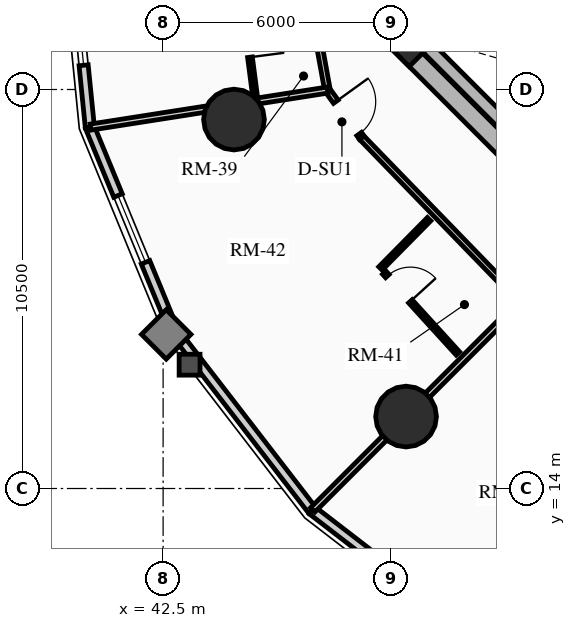
"""IFC4 building model, lengths in metres.
Left out: names, types, materials, properties, quantities, classifications, styles, units other than length and angle.
Written with IfcOpenShell. Run it as: python <this file> out.ifc"""

import sys

from ifc_helpers import new_model, si_unit, direction, frame, frame_2d, origin, origin_2d, place, context, subcontext, project, spatial, rectangle, circle, extrude, source, transform, mapped, element, fill, save


model = new_model("IFC4")
c1 = context("Model", 3, precision=1e-05, world=origin(), true_north=direction((0.0, 1.0)))
c2 = subcontext(c1, "Body", "Model", "MODEL_VIEW")
j1 = project(units=[si_unit("LENGTHUNIT", "METRE"), si_unit("PLANEANGLEUNIT", "RADIAN")], contexts=[c1])
p1 = place(None, origin())
s1 = spatial("IfcSite", under=j1, at=p1, CompositionType="ELEMENT")
p2 = place(p1, origin())
s2 = spatial("IfcBuilding", under=s1, at=p2, CompositionType="ELEMENT")
p3 = place(p2, frame((0.0, 0.0, 48.19)))
s3 = spatial("IfcBuildingStorey", under=s2, at=p3, CompositionType="ELEMENT", Elevation=48.19)
p4 = place(p3, frame((58.773, 15.661, 0.0), z_axis=(0.0, 0.0, 1.0), x_axis=(-0.707106781187, 0.707106781187, 0.0)))
e1 = element("IfcWall", 1, at=p4, inside=s3, PredefinedType="SHEAR", context=c2, shape_type="SweptSolid", body=[
    extrude(rectangle(XDim=14.3, YDim=0.5, at=frame_2d((7.15, 0.0))), origin(), (0.0, 0.0, 1.0), 2.91),
])
p5 = place(p3, frame((48.838, 25.596, 0.0), z_axis=(0.0, 0.0, 1.0), x_axis=(0.707106781187, 0.707106781187, 0.0)))
e2 = element("IfcWall", 2, at=p5, inside=s3, PredefinedType="SHEAR", context=c2, shape_type="SweptSolid", body=[
    extrude(rectangle(XDim=10.7, YDim=0.5, at=frame_2d((5.35, 0.0))), origin(), (0.0, 0.0, 1.0), 2.91),
])
m1 = source(origin(), c2, "Body", "SweptSolid", [
    extrude(rectangle(XDim=1.5, YDim=2.02, at=frame_2d((0.75, 1.01))), frame((0.0, 0.26, 0.0), z_axis=(0.0, -1.0, 0.0), x_axis=(1.0, 0.0, 0.0)), (0.0, 0.0, 1.0), 0.52),
])
p6 = place(p5, frame((4.6, 0.0, 0.0)))
e3 = element("IfcOpeningElement", 3, at=p6, cuts=e2, PredefinedType="OPENING", context=c2, shape_type="MappedRepresentation", body=[
    mapped(m1, transform((0.0, 0.0, 0.0), x_axis=(1.0, 0.0, 0.0), y_axis=(0.0, 1.0, 0.0), z_axis=(0.0, 0.0, 1.0), scale=1.0)),
])
p7 = place(p3, frame((61.096, 18.338, 0.0), z_axis=(0.0, 0.0, 1.0), x_axis=(-0.707106781187, 0.707106781187, 0.0)))
e4 = element("IfcWall", 4, at=p7, inside=s3, PredefinedType="SHEAR", context=c2, shape_type="SweptSolid", body=[
    extrude(rectangle(XDim=13.8, YDim=0.35, at=frame_2d((6.9, 0.0))), origin(), (0.0, 0.0, 1.0), 2.91),
])
m2 = source(origin(), c2, "Body", "SweptSolid", [
    extrude(rectangle(XDim=1.1, YDim=2.015, at=frame_2d((0.55, 1.007))), frame((0.0, 0.185, 0.0), z_axis=(0.0, -1.0, 0.0), x_axis=(1.0, 0.0, 0.0)), (0.0, 0.0, 1.0), 0.37),
])
p8 = place(p7, frame((4.9, 0.0, 0.0)))
e5 = element("IfcOpeningElement", 5, at=p8, cuts=e4, PredefinedType="OPENING", context=c2, shape_type="MappedRepresentation", body=[
    mapped(m2, transform((0.0, 0.0, 0.0), x_axis=(1.0, 0.0, 0.0), y_axis=(0.0, 1.0, 0.0), z_axis=(0.0, 0.0, 1.0), scale=1.0)),
])
m3 = source(origin(), c2, "Body", "SweptSolid", [
    extrude(rectangle(XDim=1.15, YDim=2.02, at=frame_2d((0.575, 1.01))), frame((0.0, 0.185, 0.0), z_axis=(0.0, -1.0, 0.0), x_axis=(1.0, 0.0, 0.0)), (0.0, 0.0, 1.0), 0.37),
])
p9 = place(p7, frame((7.32, 0.0, 0.0)))
e6 = element("IfcOpeningElement", 6, at=p9, cuts=e4, PredefinedType="OPENING", context=c2, shape_type="MappedRepresentation", body=[
    mapped(m3, transform((0.0, 0.0, 0.0), x_axis=(1.0, 0.0, 0.0), y_axis=(0.0, 1.0, 0.0), z_axis=(0.0, 0.0, 1.0), scale=1.0)),
])
p10 = place(p3, frame((53.922, 21.141, 0.0), z_axis=(0.0, 0.0, 1.0), x_axis=(-0.707106781187, 0.707106781187, 0.0)))
e7 = element("IfcWall", 7, at=p10, inside=s3, PredefinedType="SHEAR", context=c2, shape_type="SweptSolid", body=[
    extrude(rectangle(XDim=6.745, YDim=0.35, at=frame_2d((3.373, 0.0))), origin(), (0.0, 0.0, 1.0), 2.91),
])
p11 = place(p3, frame((48.976, 25.706, 0.0), z_axis=(0.0, 0.0, 1.0), x_axis=(0.707106781187, 0.707106781187, 0.0)))
e8 = element("IfcColumn", 8, at=p11, inside=s3, PredefinedType="COLUMN", context=c2, shape_type="SweptSolid", body=[
    extrude(rectangle(XDim=0.85, YDim=0.85, at=origin_2d()), origin(), (0.0, 0.0, 1.0), 2.91),
])
for number, where, z_axis, x_axis in (
    (9, (44.365, 23.709, 0.0), (0.0, 0.0, 1.0), (1.0, 0.0, 0.0)),
    (10, (48.893, 15.893, 0.0), (0.0, 0.0, 1.0), (1.0, 0.0, 0.0)),
):
    element("IfcColumn", number, at=place(p3, frame(where, z_axis=z_axis, x_axis=x_axis)), inside=s3, PredefinedType="USERDEFINED", context=c2, shape_type="SweptSolid", body=[
        extrude(circle(Radius=0.8, at=origin_2d()), origin(), (0.0, 0.0, 1.0), 2.91),
    ])
p12 = place(p3, frame((40.572, 23.507, 0.0), z_axis=(0.0, 0.0, 1.0), x_axis=(-0.100165739718, 0.994970765694, 0.0)))
e11 = element("IfcWall", 11, at=p12, inside=s3, PredefinedType="SOLIDWALL", context=c2, shape_type="SweptSolid", body=[
    extrude(rectangle(XDim=5.477, YDim=0.24, at=frame_2d((2.738, 0.0))), origin(), (0.0, 0.0, 1.0), 2.073),
])
m4 = source(origin(), c2, "Body", "SweptSolid", [
    extrude(rectangle(XDim=2.2, YDim=1.35, at=frame_2d((1.1, 0.675))), frame((0.0, 0.13, 0.0), z_axis=(0.0, -1.0, 0.0), x_axis=(1.0, 0.0, 0.0)), (0.0, 0.0, 1.0), 0.26),
])
p13 = place(p12, frame((1.638, 0.0, 0.65)))
e12 = element("IfcOpeningElement", 12, at=p13, cuts=e11, PredefinedType="OPENING", context=c2, shape_type="MappedRepresentation", body=[
    mapped(m4, transform((0.0, 0.0, 0.0), x_axis=(1.0, 0.0, 0.0), y_axis=(0.0, 1.0, 0.0), z_axis=(0.0, 0.0, 1.0), scale=1.0)),
])
p14 = place(p3, frame((42.778, 18.156, 0.0), z_axis=(0.0, 0.0, 1.0), x_axis=(-0.381027682565, 0.924563629567, 0.0)))
e13 = element("IfcWall", 13, at=p14, inside=s3, PredefinedType="SOLIDWALL", context=c2, shape_type="SweptSolid", body=[
    extrude(rectangle(XDim=5.789, YDim=0.24, at=frame_2d((2.894, 0.0))), origin(), (0.0, 0.0, 1.0), 2.073),
])
m5 = source(origin(), c2, "Body", "SweptSolid", [
    extrude(rectangle(XDim=1.9, YDim=1.35, at=frame_2d((0.95, 0.675))), frame((0.0, 0.13, 0.0), z_axis=(0.0, -1.0, 0.0), x_axis=(1.0, 0.0, 0.0)), (0.0, 0.0, 1.0), 0.26),
])
p15 = place(p14, frame((1.944, 0.0, 0.65)))
e14 = element("IfcOpeningElement", 14, at=p15, cuts=e13, PredefinedType="OPENING", context=c2, shape_type="MappedRepresentation", body=[
    mapped(m5, transform((0.0, 0.0, 0.0), x_axis=(1.0, 0.0, 0.0), y_axis=(0.0, 1.0, 0.0), z_axis=(0.0, 0.0, 1.0), scale=1.0)),
])
p16 = place(p3, frame((46.425, 13.425, 0.0), z_axis=(0.0, 0.0, 1.0), x_axis=(-0.610502519057, 0.792014314407, 0.0)))
e15 = element("IfcWall", 15, at=p16, inside=s3, PredefinedType="SOLIDWALL", context=c2, shape_type="SweptSolid", body=[
    extrude(rectangle(XDim=5.973, YDim=0.24, at=frame_2d((2.987, 0.0))), origin(), (0.0, 0.0, 1.0), 2.073),
])
p17 = place(p3, frame((51.156, 9.778, 0.0), z_axis=(0.0, 0.0, 1.0), x_axis=(-0.792014314407, 0.610502519057, 0.0)))
e16 = element("IfcWall", 16, at=p17, inside=s3, PredefinedType="SOLIDWALL", context=c2, shape_type="SweptSolid", body=[
    extrude(rectangle(XDim=5.973, YDim=0.24, at=frame_2d((2.987, 0.0))), origin(), (0.0, 0.0, 1.0), 2.073),
])
p18 = place(p17, frame((1.887, 0.0, 0.65)))
e17 = element("IfcOpeningElement", 17, at=p18, cuts=e16, PredefinedType="OPENING", context=c2, shape_type="MappedRepresentation", body=[
    mapped(m4, transform((0.0, 0.0, 0.0), x_axis=(1.0, 0.0, 0.0), y_axis=(0.0, 1.0, 0.0), z_axis=(0.0, 0.0, 1.0), scale=1.0)),
])
p19 = place(p3, frame((46.576, 25.85, 0.0), z_axis=(0.0, 0.0, 1.0), x_axis=(0.178962865041, -0.983855829345, 0.0)))
e18 = element("IfcWall", 18, at=p19, inside=s3, PredefinedType="PARTITIONING", context=c2, shape_type="SweptSolid", body=[
    extrude(rectangle(XDim=1.387, YDim=0.15, at=frame_2d((0.694, 0.0))), origin(), (0.0, 0.0, 1.0), 2.159),
])
p20 = place(p3, frame((46.824, 24.485, 0.0), z_axis=(0.0, 0.0, 1.0), x_axis=(0.584890953925, -0.811111935565, 0.0)))
e19 = element("IfcWall", 19, at=p20, inside=s3, PredefinedType="PARTITIONING", context=c2, shape_type="SweptSolid", body=[
    extrude(rectangle(XDim=1.547, YDim=0.15, at=frame_2d((0.773, 0.0))), origin(), (0.0, 0.0, 1.0), 2.205),
])
m6 = source(origin(), c2, "Body", "SweptSolid", [
    extrude(rectangle(XDim=1.05, YDim=2.015, at=frame_2d((0.525, 1.007))), frame((0.0, 0.085, 0.0), z_axis=(0.0, -1.0, 0.0), x_axis=(1.0, 0.0, 0.0)), (0.0, 0.0, 1.0), 0.17),
])
p21 = place(p20, frame((0.377, 0.0, 0.0)))
e20 = element("IfcOpeningElement", 20, at=p21, cuts=e19, PredefinedType="OPENING", context=c2, shape_type="MappedRepresentation", body=[
    mapped(m6, transform((0.0, 0.0, 0.0), x_axis=(1.0, 0.0, 0.0), y_axis=(0.0, 1.0, 0.0), z_axis=(0.0, 0.0, 1.0), scale=1.0)),
])
p22 = place(p3, frame((47.729, 23.23, 0.0), z_axis=(0.0, 0.0, 1.0), x_axis=(0.696119834292, -0.717925606386, 0.0)))
e21 = element("IfcWall", 21, at=p22, inside=s3, PredefinedType="PARTITIONING", context=c2, shape_type="SweptSolid", body=[
    extrude(rectangle(XDim=6.012, YDim=0.15, at=frame_2d((3.006, 0.0))), origin(), (0.0, 0.0, 1.0), 2.635),
])
p23 = place(p3, frame((46.824, 24.485, 0.0), z_axis=(0.0, 0.0, 1.0), x_axis=(-0.988003730645, -0.154430010784, 0.0)))
e22 = element("IfcWall", 22, at=p23, inside=s3, PredefinedType="PARTITIONING", context=c2, shape_type="SweptSolid", body=[
    extrude(rectangle(XDim=6.308, YDim=0.16, at=frame_2d((3.154, 0.0))), origin(), (0.0, 0.0, 1.0), 2.073),
])
p24 = place(p3, frame((51.914, 18.914, 0.0), z_axis=(0.0, 0.0, 1.0), x_axis=(-0.707106781187, -0.707106781187, 0.0)))
e23 = element("IfcWall", 23, at=p24, inside=s3, PredefinedType="PARTITIONING", context=c2, shape_type="SweptSolid", body=[
    extrude(rectangle(XDim=7.743, YDim=0.16, at=frame_2d((3.872, 0.0))), origin(), (0.0, 0.0, 1.0), 2.073),
])
p25 = place(p3, frame((44.654, 26.361, 0.0), z_axis=(0.0, 0.0, 1.0), x_axis=(0.129433729192, -0.991588074629, 0.0)))
e24 = element("IfcWall", 24, at=p25, inside=s3, PredefinedType="PARTITIONING", context=c2, shape_type="SweptSolid", body=[
    extrude(rectangle(XDim=2.097, YDim=0.125, at=frame_2d((1.049, 0.0))), origin(), (0.0, 0.0, 1.0), 2.073),
])
m7 = source(origin(), c2, "Body", "SweptSolid", [
    extrude(rectangle(XDim=0.9, YDim=2.005, at=frame_2d((0.45, 1.002))), frame((0.0, 0.073, 0.0), z_axis=(0.0, -1.0, 0.0), x_axis=(1.0, 0.0, 0.0)), (0.0, 0.0, 1.0), 0.145),
])
p26 = place(p25, frame((0.12, 0.0, 0.0)))
e25 = element("IfcOpeningElement", 25, at=p26, cuts=e24, PredefinedType="OPENING", context=c2, shape_type="MappedRepresentation", body=[
    mapped(m7, transform((0.0, 0.0, 0.0), x_axis=(1.0, 0.0, 0.0), y_axis=(0.0, 1.0, 0.0), z_axis=(0.0, 0.0, 1.0), scale=1.0)),
])
p27 = place(p3, frame((49.498, 21.087, 0.0), z_axis=(0.0, 0.0, 1.0), x_axis=(-0.702129708151, -0.71204906638, 0.0)))
e26 = element("IfcWall", 26, at=p27, inside=s3, PredefinedType="PARTITIONING", context=c2, shape_type="SweptSolid", body=[
    extrude(rectangle(XDim=1.821, YDim=0.125, at=frame_2d((0.911, 0.0))), origin(), (0.0, 0.0, 1.0), 2.635),
])
p28 = place(p3, frame((48.32, 19.68, 0.0), z_axis=(0.0, 0.0, 1.0), x_axis=(0.673403410236, -0.739275217414, 0.0)))
e27 = element("IfcWall", 27, at=p28, inside=s3, PredefinedType="PARTITIONING", context=c2, shape_type="SweptSolid", body=[
    extrude(rectangle(XDim=2.876, YDim=0.125, at=frame_2d((1.438, 0.0))), origin(), (0.0, 0.0, 1.0), 2.635),
])
p29 = place(p28, frame((0.12, 0.0, 0.0)))
e28 = element("IfcOpeningElement", 28, at=p29, cuts=e27, PredefinedType="OPENING", context=c2, shape_type="MappedRepresentation", body=[
    mapped(m7, transform((0.0, 0.0, 0.0), x_axis=(1.0, 0.0, 0.0), y_axis=(0.0, 1.0, 0.0), z_axis=(0.0, 0.0, 1.0), scale=1.0)),
])
m8 = source(origin(), c2, "Body", "SweptSolid", [
    extrude(rectangle(XDim=2.2, YDim=1.35, at=frame_2d((1.1, 0.675))), frame((0.0, 0.03, 0.0), z_axis=(0.0, -1.0, 0.0), x_axis=(1.0, 0.0, 0.0)), (0.0, 0.0, 1.0), 0.06),
])
p30 = place(p13, origin())
e29 = element("IfcWindow", 29, at=p30, inside=s3, PartitioningType="DOUBLE_PANEL_VERTICAL", PredefinedType="WINDOW", context=c2, shape_type="MappedRepresentation", body=[
    mapped(m8, transform((0.0, 0.0, 0.0), x_axis=(1.0, 0.0, 0.0), y_axis=(0.0, 1.0, 0.0), z_axis=(0.0, 0.0, 1.0), scale=1.0)),
])
fill(e12, e29)
m9 = source(origin(), c2, "Body", "SweptSolid", [
    extrude(rectangle(XDim=1.9, YDim=1.35, at=frame_2d((0.95, 0.675))), frame((0.0, 0.03, 0.0), z_axis=(0.0, -1.0, 0.0), x_axis=(1.0, 0.0, 0.0)), (0.0, 0.0, 1.0), 0.06),
])
p31 = place(p15, origin())
e30 = element("IfcWindow", 30, at=p31, inside=s3, PartitioningType="DOUBLE_PANEL_VERTICAL", PredefinedType="WINDOW", context=c2, shape_type="MappedRepresentation", body=[
    mapped(m9, transform((0.0, 0.0, 0.0), x_axis=(1.0, 0.0, 0.0), y_axis=(0.0, 1.0, 0.0), z_axis=(0.0, 0.0, 1.0), scale=1.0)),
])
fill(e14, e30)
m10 = source(origin(), c2, "Body", "SweptSolid", [
    extrude(rectangle(XDim=0.9, YDim=2.005, at=frame_2d((0.45, 1.002))), frame((0.0, 0.025, 0.0), z_axis=(0.0, -1.0, 0.0), x_axis=(1.0, 0.0, 0.0)), (0.0, 0.0, 1.0), 0.05),
])
p32 = place(p26, origin())
e31 = element("IfcDoor", 31, at=p32, inside=s3, OperationType="SINGLE_SWING_RIGHT", PredefinedType="DOOR", context=c2, shape_type="MappedRepresentation", body=[
    mapped(m10, transform((0.0, 0.0, 0.0), x_axis=(1.0, 0.0, 0.0), y_axis=(0.0, 1.0, 0.0), z_axis=(0.0, 0.0, 1.0), scale=1.0)),
])
fill(e25, e31)
m11 = source(origin(), c2, "Body", "SweptSolid", [
    extrude(rectangle(XDim=1.05, YDim=2.015, at=frame_2d((0.525, 1.007))), frame((0.0, 0.025, 0.0), z_axis=(0.0, -1.0, 0.0), x_axis=(1.0, 0.0, 0.0)), (0.0, 0.0, 1.0), 0.05),
])
p33 = place(p21, origin())
e32 = element("IfcDoor", 32, at=p33, inside=s3, OperationType="SINGLE_SWING_LEFT", PredefinedType="DOOR", context=c2, shape_type="MappedRepresentation", body=[
    mapped(m11, transform((0.0, 0.0, 0.0), x_axis=(1.0, 0.0, 0.0), y_axis=(0.0, 1.0, 0.0), z_axis=(0.0, 0.0, 1.0), scale=1.0)),
])
fill(e20, e32)
p34 = place(p29, origin())
e33 = element("IfcDoor", 33, at=p34, inside=s3, OperationType="SINGLE_SWING_RIGHT", PredefinedType="DOOR", context=c2, shape_type="MappedRepresentation", body=[
    mapped(m10, transform((0.0, 0.0, 0.0), x_axis=(1.0, 0.0, 0.0), y_axis=(0.0, 1.0, 0.0), z_axis=(0.0, 0.0, 1.0), scale=1.0)),
])
fill(e28, e33)
save(model, sys.argv[1])
